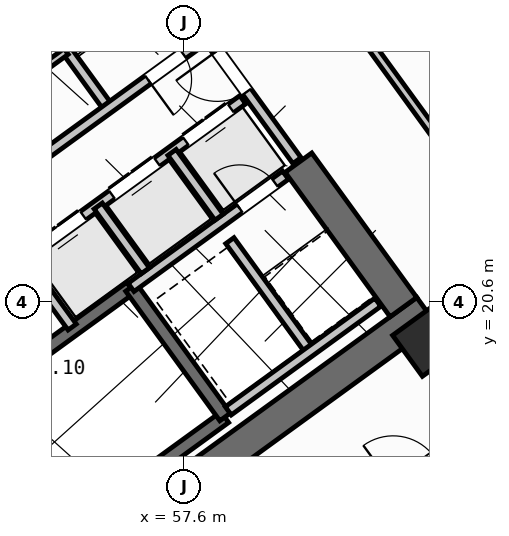
"""IFC4 building model, lengths in metres.
Left out: names, types, materials, properties, quantities, classifications, styles, units other than length and angle.
Written with IfcOpenShell. Run it as: python <this file> out.ifc"""

import sys

from ifc_helpers import new_model, si_unit, direction, frame, frame_2d, origin, origin_2d, place, context, subcontext, project, spatial, rectangle, hollow_rectangle, extrude, source, transform, mapped, element, fill, save


model = new_model("IFC4")
c1 = context("Model", 3, precision=1e-05, world=origin(), true_north=direction((0.0, 1.0)))
c2 = subcontext(c1, "Body", "Model", "MODEL_VIEW")
j1 = project(units=[si_unit("LENGTHUNIT", "METRE"), si_unit("PLANEANGLEUNIT", "RADIAN")], contexts=[c1])
p1 = place(None, origin())
s1 = spatial("IfcSite", under=j1, at=p1, CompositionType="ELEMENT")
p2 = place(p1, origin())
s2 = spatial("IfcBuilding", under=s1, at=p2, CompositionType="ELEMENT")
p3 = place(p2, frame((0.0, 0.0, 42.0)))
s3 = spatial("IfcBuildingStorey", under=s2, at=p3, CompositionType="ELEMENT", Elevation=42.0)
p4 = place(p3, frame((52.318, 13.11, 0.0), z_axis=(0.0, 0.0, 1.0), x_axis=(0.809019445368, 0.587781878776, 0.0)))
e1 = element("IfcWall", 1, at=p4, inside=s3, PredefinedType="SHEAR", context=c2, shape_type="SweptSolid", body=[
    extrude(rectangle(XDim=12.44, YDim=0.65, at=frame_2d((6.22, 0.0))), origin(), (0.0, 0.0, 1.0), 3.35),
])
p5 = place(p3, frame((61.929, 20.494, 0.0), z_axis=(0.0, 0.0, 1.0), x_axis=(-0.58782982593, 0.808984607855, 0.0)))
e2 = element("IfcWall", 2, at=p5, inside=s3, PredefinedType="SHEAR", context=c2, shape_type="SweptSolid", body=[
    extrude(rectangle(XDim=3.525, YDim=0.65, at=frame_2d((1.762, 0.0))), origin(), (0.0, 0.0, 1.0), 3.35),
])
m1 = source(origin(), c2, "Body", "SweptSolid", [
    extrude(hollow_rectangle(XDim=1.0, YDim=1.0, WallThickness=0.04, at=origin_2d()), origin(), (0.0, 0.0, 1.0), 3.6),
])
p6 = place(p3, frame((62.414, 19.827, 0.0), z_axis=(0.0, 0.0, 1.0), x_axis=(0.809016994375, 0.587785252292, 0.0)))
e3 = element("IfcColumn", 3, at=p6, inside=s3, PredefinedType="COLUMN", context=c2, shape_type="MappedRepresentation", body=[
    mapped(m1, transform((0.0, 0.0, 0.0), scale=1.0)),
])
p7 = place(p3, frame((43.938, 25.192, 0.0), z_axis=(0.0, 0.0, 1.0), x_axis=(0.809016324578, 0.587786174187, 0.0)))
e4 = element("IfcWall", 4, at=p7, inside=s3, PredefinedType="STANDARD", context=c2, shape_type="SweptSolid", body=[
    extrude(rectangle(XDim=17.587, YDim=0.32, at=frame_2d((8.794, 0.0))), origin(), (0.0, 0.0, 1.0), 3.35),
])
p8 = place(p7, frame((14.914, 0.0, 0.0)))
e5 = element("IfcOpeningElement", 5, at=p8, cuts=e4, PredefinedType="OPENING", context=c2, shape_type="SweptSolid", body=[
    extrude(rectangle(XDim=1.05, YDim=2.15, at=frame_2d((0.525, 1.075))), frame((0.0, 0.17, 0.0), z_axis=(0.0, -1.0, 0.0), x_axis=(1.0, 0.0, 0.0)), (0.0, 0.0, 1.0), 0.34),
])
p9 = place(p7, frame((2.169, 0.0, 0.8)))
e6 = element("IfcOpeningElement", 6, at=p9, cuts=e4, PredefinedType="OPENING", context=c2, shape_type="SweptSolid", body=[
    extrude(rectangle(XDim=2.1, YDim=1.55, at=frame_2d((1.05, 0.775))), frame((0.0, 0.17, 0.0), z_axis=(0.0, -1.0, 0.0), x_axis=(1.0, 0.0, 0.0)), (0.0, 0.0, 1.0), 0.34),
])
p10 = place(p7, frame((7.319, 0.0, 0.8)))
e7 = element("IfcOpeningElement", 7, at=p10, cuts=e4, PredefinedType="OPENING", context=c2, shape_type="SweptSolid", body=[
    extrude(rectangle(XDim=2.1, YDim=1.55, at=frame_2d((1.05, 0.775))), frame((0.0, 0.17, 0.0), z_axis=(0.0, -1.0, 0.0), x_axis=(1.0, 0.0, 0.0)), (0.0, 0.0, 1.0), 0.34),
])
p11 = place(p3, frame((58.455, 35.484, 0.0), z_axis=(0.0, 0.0, 1.0), x_axis=(0.587783625747, -0.809018176127, 0.0)))
e8 = element("IfcWall", 8, at=p11, inside=s3, PredefinedType="STANDARD", context=c2, shape_type="SweptSolid", body=[
    extrude(rectangle(XDim=21.587, YDim=0.32, at=frame_2d((10.794, 0.0))), origin(), (0.0, 0.0, 1.0), 2.725),
])
p12 = place(p11, frame((1.529, 0.0, 0.85)))
e9 = element("IfcOpeningElement", 9, at=p12, cuts=e8, PredefinedType="OPENING", context=c2, shape_type="SweptSolid", body=[
    extrude(rectangle(XDim=1.8, YDim=1.5, at=frame_2d((0.9, 0.75))), frame((0.0, 0.17, 0.0), z_axis=(0.0, -1.0, 0.0), x_axis=(1.0, 0.0, 0.0)), (0.0, 0.0, 1.0), 0.34),
])
p13 = place(p11, frame((10.444, 0.0, 0.85)))
e10 = element("IfcOpeningElement", 10, at=p13, cuts=e8, PredefinedType="OPENING", context=c2, shape_type="SweptSolid", body=[
    extrude(rectangle(XDim=1.8, YDim=1.5, at=frame_2d((0.9, 0.75))), frame((0.0, 0.17, 0.0), z_axis=(0.0, -1.0, 0.0), x_axis=(1.0, 0.0, 0.0)), (0.0, 0.0, 1.0), 0.34),
])
p14 = place(p11, frame((17.595, 0.0, 0.85)))
e11 = element("IfcOpeningElement", 11, at=p14, cuts=e8, PredefinedType="OPENING", context=c2, shape_type="SweptSolid", body=[
    extrude(rectangle(XDim=1.5, YDim=1.5, at=frame_2d((0.75, 0.75))), frame((0.0, 0.17, 0.0), z_axis=(0.0, -1.0, 0.0), x_axis=(1.0, 0.0, 0.0)), (0.0, 0.0, 1.0), 0.34),
])
p15 = place(p3, frame((71.098, 17.731, 0.0), z_axis=(0.0, 0.0, 1.0), x_axis=(-0.809021120468, -0.587779573171, 0.0)))
e12 = element("IfcWall", 12, at=p15, inside=s3, PredefinedType="STANDARD", context=c2, shape_type="SweptSolid", body=[
    extrude(rectangle(XDim=17.588, YDim=0.32, at=frame_2d((8.794, 0.0))), origin(), (0.0, 0.0, 1.0), 3.35),
])
p16 = place(p15, frame((1.624, 0.0, 0.0)))
e13 = element("IfcOpeningElement", 13, at=p16, cuts=e12, PredefinedType="OPENING", context=c2, shape_type="SweptSolid", body=[
    extrude(rectangle(XDim=1.05, YDim=2.15, at=frame_2d((0.525, 1.075))), frame((0.0, 0.17, 0.0), z_axis=(0.0, -1.0, 0.0), x_axis=(1.0, 0.0, 0.0)), (0.0, 0.0, 1.0), 0.34),
])
p17 = place(p15, frame((4.104, 0.0, 1.0)))
e14 = element("IfcOpeningElement", 14, at=p17, cuts=e12, PredefinedType="OPENING", context=c2, shape_type="SweptSolid", body=[
    extrude(rectangle(XDim=0.9, YDim=1.25, at=frame_2d((0.45, 0.625))), frame((0.0, 0.17, 0.0), z_axis=(0.0, -1.0, 0.0), x_axis=(1.0, 0.0, 0.0)), (0.0, 0.0, 1.0), 0.34),
])
p18 = place(p15, frame((7.879, 0.0, 0.85)))
e15 = element("IfcOpeningElement", 15, at=p18, cuts=e12, PredefinedType="OPENING", context=c2, shape_type="SweptSolid", body=[
    extrude(rectangle(XDim=1.8, YDim=1.5, at=frame_2d((0.9, 0.75))), frame((0.0, 0.17, 0.0), z_axis=(0.0, -1.0, 0.0), x_axis=(1.0, 0.0, 0.0)), (0.0, 0.0, 1.0), 0.34),
])
p19 = place(p15, frame((13.529, 0.0, 0.85)))
e16 = element("IfcOpeningElement", 16, at=p19, cuts=e12, PredefinedType="OPENING", context=c2, shape_type="SweptSolid", body=[
    extrude(rectangle(XDim=1.5, YDim=1.5, at=frame_2d((0.75, 0.75))), frame((0.0, 0.17, 0.0), z_axis=(0.0, -1.0, 0.0), x_axis=(1.0, 0.0, 0.0)), (0.0, 0.0, 1.0), 0.34),
])
p20 = place(p3, frame((49.863, 23.44, 0.0), z_axis=(0.0, 0.0, 1.0), x_axis=(0.809003474932, 0.587803859759, 0.0)))
e17 = element("IfcWall", 17, at=p20, inside=s3, PredefinedType="SHEAR", context=c2, shape_type="SweptSolid", body=[
    extrude(rectangle(XDim=7.46, YDim=0.26, at=frame_2d((3.73, 0.0))), origin(), (0.0, 0.0, 1.0), 3.35),
])
p21 = place(p20, frame((0.36, 0.0, 0.0)))
e18 = element("IfcOpeningElement", 18, at=p21, cuts=e17, PredefinedType="OPENING", context=c2, shape_type="SweptSolid", body=[
    extrude(rectangle(XDim=0.86, YDim=2.05, at=frame_2d((0.43, 1.025))), frame((0.0, 0.14, 0.0), z_axis=(0.0, -1.0, 0.0), x_axis=(1.0, 0.0, 0.0)), (0.0, 0.0, 1.0), 0.28),
])
p22 = place(p3, frame((52.472, 14.013, 0.0), z_axis=(0.0, 0.0, 1.0), x_axis=(0.809028366311, 0.587769599847, 0.0)))
e19 = element("IfcWall", 19, at=p22, inside=s3, PredefinedType="SHEAR", context=c2, shape_type="SweptSolid", body=[
    extrude(rectangle(XDim=7.33, YDim=0.26, at=frame_2d((3.665, 0.0))), origin(), (0.0, 0.0, 1.0), 3.35),
])
p23 = place(p3, frame((50.615, 16.57, 0.0), z_axis=(0.0, 0.0, 1.0), x_axis=(0.809028366311, 0.587769599847, 0.0)))
e20 = element("IfcWall", 20, at=p23, inside=s3, PredefinedType="SHEAR", context=c2, shape_type="SweptSolid", body=[
    extrude(rectangle(XDim=7.33, YDim=0.26, at=frame_2d((3.665, 0.0))), origin(), (0.0, 0.0, 1.0), 3.35),
])
p24 = place(p23, frame((0.22, 0.0, 0.0)))
e21 = element("IfcOpeningElement", 21, at=p24, cuts=e20, PredefinedType="OPENING", context=c2, shape_type="SweptSolid", body=[
    extrude(rectangle(XDim=1.1, YDim=2.1, at=frame_2d((0.55, 1.05))), frame((0.0, 0.14, 0.0), z_axis=(0.0, -1.0, 0.0), x_axis=(1.0, 0.0, 0.0)), (0.0, 0.0, 1.0), 0.28),
])
p25 = place(p3, frame((58.41, 18.327, 0.0), z_axis=(0.0, 0.0, 1.0), x_axis=(-0.58776738483, 0.809029975545, 0.0)))
e22 = element("IfcWall", 22, at=p25, inside=s3, PredefinedType="SHEAR", context=c2, shape_type="SweptSolid", body=[
    extrude(rectangle(XDim=3.16, YDim=0.26, at=frame_2d((1.58, 0.0))), origin(), (0.0, 0.0, 1.0), 3.35),
])
p26 = place(p3, frame((56.553, 20.884, 0.0), z_axis=(0.0, 0.0, 1.0), x_axis=(0.809035789462, 0.587759382205, 0.0)))
e23 = element("IfcWall", 23, at=p26, inside=s3, PredefinedType="STANDARD", context=c2, shape_type="SweptSolid", body=[
    extrude(rectangle(XDim=3.768, YDim=0.2, at=frame_2d((1.884, 0.0))), origin(), (0.0, 0.0, 1.0), 3.34),
])
p27 = place(p26, frame((2.65, 0.0, 0.0)))
e24 = element("IfcOpeningElement", 24, at=p27, cuts=e23, PredefinedType="OPENING", context=c2, shape_type="SweptSolid", body=[
    extrude(rectangle(XDim=0.86, YDim=2.05, at=frame_2d((0.43, 1.025))), frame((0.0, 0.11, 0.0), z_axis=(0.0, -1.0, 0.0), x_axis=(1.0, 0.0, 0.0)), (0.0, 0.0, 1.0), 0.22),
])
p28 = place(p3, frame((54.421, 21.436, 0.0), z_axis=(0.0, 0.0, 1.0), x_axis=(0.809013710463, 0.587789772183, 0.0)))
e25 = element("IfcWall", 25, at=p28, inside=s3, PredefinedType="STANDARD", context=c2, shape_type="SweptSolid", body=[
    extrude(rectangle(XDim=5.36, YDim=0.2, at=frame_2d((2.68, 0.0))), origin(), (0.0, 0.0, 1.0), 3.34),
])
p29 = place(p28, frame((0.37, 0.0, 0.0)))
e26 = element("IfcOpeningElement", 26, at=p29, cuts=e25, PredefinedType="OPENING", context=c2, shape_type="SweptSolid", body=[
    extrude(rectangle(XDim=1.1, YDim=2.15, at=frame_2d((0.55, 1.075))), frame((0.0, 0.11, 0.0), z_axis=(0.0, -1.0, 0.0), x_axis=(1.0, 0.0, 0.0)), (0.0, 0.0, 1.0), 0.22),
])
p30 = place(p28, frame((2.17, 0.0, 0.0)))
e27 = element("IfcOpeningElement", 27, at=p30, cuts=e25, PredefinedType="OPENING", context=c2, shape_type="SweptSolid", body=[
    extrude(rectangle(XDim=1.1, YDim=2.15, at=frame_2d((0.55, 1.075))), frame((0.0, 0.11, 0.0), z_axis=(0.0, -1.0, 0.0), x_axis=(1.0, 0.0, 0.0)), (0.0, 0.0, 1.0), 0.22),
])
p31 = place(p28, frame((3.97, 0.0, 0.0)))
e28 = element("IfcOpeningElement", 28, at=p31, cuts=e25, PredefinedType="OPENING", context=c2, shape_type="SweptSolid", body=[
    extrude(rectangle(XDim=1.1, YDim=2.15, at=frame_2d((0.55, 1.075))), frame((0.0, 0.11, 0.0), z_axis=(0.0, -1.0, 0.0), x_axis=(1.0, 0.0, 0.0)), (0.0, 0.0, 1.0), 0.22),
])
p32 = place(p3, frame((55.391, 20.102, 0.0), z_axis=(0.0, 0.0, 1.0), x_axis=(-0.58778447739, 0.809017557374, 0.0)))
e29 = element("IfcWall", 29, at=p32, inside=s3, PredefinedType="STANDARD", context=c2, shape_type="SweptSolid", body=[
    extrude(rectangle(XDim=1.65, YDim=0.2, at=frame_2d((0.825, 0.0))), origin(), (0.0, 0.0, 1.0), 3.34),
])
p33 = place(p3, frame((56.834, 21.212, 0.0), z_axis=(0.0, 0.0, 1.0), x_axis=(-0.58776738483, 0.809029975545, 0.0)))
e30 = element("IfcWall", 30, at=p33, inside=s3, PredefinedType="STANDARD", context=c2, shape_type="SweptSolid", body=[
    extrude(rectangle(XDim=1.58, YDim=0.2, at=frame_2d((0.79, 0.0))), origin(), (0.0, 0.0, 1.0), 3.34),
])
p34 = place(p3, frame((58.29, 22.27, 0.0), z_axis=(0.0, 0.0, 1.0), x_axis=(-0.587840865826, 0.808976585857, 0.0)))
e31 = element("IfcWall", 31, at=p34, inside=s3, PredefinedType="STANDARD", context=c2, shape_type="SweptSolid", body=[
    extrude(rectangle(XDim=1.58, YDim=0.2, at=frame_2d((0.79, 0.0))), origin(), (0.0, 0.0, 1.0), 3.34),
])
p35 = place(p3, frame((60.067, 19.655, 0.0), z_axis=(0.0, 0.0, 1.0), x_axis=(-0.587800520745, 0.809005900975, 0.0)))
e32 = element("IfcWall", 32, at=p35, inside=s3, PredefinedType="STANDARD", context=c2, shape_type="SweptSolid", body=[
    extrude(rectangle(XDim=2.66, YDim=0.2, at=frame_2d((1.33, 0.0))), origin(), (0.0, 0.0, 1.0), 3.34),
])
p36 = place(p3, frame((58.472, 18.447, 0.0), z_axis=(0.0, 0.0, 1.0), x_axis=(0.809022487728, 0.587777691266, 0.0)))
e33 = element("IfcWall", 33, at=p36, inside=s3, PredefinedType="STANDARD", context=c2, shape_type="SweptSolid", body=[
    extrude(rectangle(XDim=3.648, YDim=0.2, at=frame_2d((1.824, 0.0))), origin(), (0.0, 0.0, 1.0), 3.34),
])
p37 = place(p3, frame((56.111, 24.419, 0.0), z_axis=(0.0, 0.0, 1.0), x_axis=(-0.58777848983, 0.809021907548, 0.0)))
e34 = element("IfcWall", 34, at=p37, inside=s3, PredefinedType="STANDARD", context=c2, shape_type="SweptSolid", body=[
    extrude(rectangle(XDim=2.88, YDim=0.2, at=frame_2d((1.44, 0.0))), origin(), (0.0, 0.0, 1.0), 3.34),
])
p38 = place(p3, frame((53.425, 22.468, 0.0), z_axis=(0.0, 0.0, 1.0), x_axis=(0.80902705128, 0.587771409902, 0.0)))
e35 = element("IfcWall", 35, at=p38, inside=s3, PredefinedType="STANDARD", context=c2, shape_type="SweptSolid", body=[
    extrude(rectangle(XDim=5.368, YDim=0.2, at=frame_2d((2.684, 0.0))), origin(), (0.0, 0.0, 1.0), 3.34),
])
p39 = place(p38, frame((4.28, 0.0, 0.0)))
e36 = element("IfcOpeningElement", 36, at=p39, cuts=e35, PredefinedType="OPENING", context=c2, shape_type="SweptSolid", body=[
    extrude(rectangle(XDim=0.86, YDim=2.05, at=frame_2d((0.43, 1.025))), frame((0.0, 0.11, 0.0), z_axis=(0.0, -1.0, 0.0), x_axis=(1.0, 0.0, 0.0)), (0.0, 0.0, 1.0), 0.22),
])
p40 = place(p38, frame((0.35, 0.0, 0.0)))
e37 = element("IfcOpeningElement", 37, at=p40, cuts=e35, PredefinedType="OPENING", context=c2, shape_type="SweptSolid", body=[
    extrude(rectangle(XDim=0.86, YDim=2.05, at=frame_2d((0.43, 1.025))), frame((0.0, 0.11, 0.0), z_axis=(0.0, -1.0, 0.0), x_axis=(1.0, 0.0, 0.0)), (0.0, 0.0, 1.0), 0.22),
])
p41 = place(p3, frame((52.618, 23.612, 0.0), z_axis=(0.0, 0.0, 1.0), x_axis=(0.809009587469, 0.587795446889, 0.0)))
e38 = element("IfcWall", 38, at=p41, inside=s3, PredefinedType="PLUMBINGWALL", context=c2, shape_type="SweptSolid", body=[
    extrude(rectangle(XDim=3.28, YDim=0.14, at=frame_2d((1.64, 0.0))), origin(), (0.0, 0.0, 1.0), 3.34),
])
p42 = place(p41, frame((0.25, 0.0, 0.0)))
e39 = element("IfcOpeningElement", 39, at=p42, cuts=e38, PredefinedType="OPENING", context=c2, shape_type="SweptSolid", body=[
    extrude(rectangle(XDim=0.78, YDim=2.05, at=frame_2d((0.39, 1.025))), frame((0.0, 0.08, 0.0), z_axis=(0.0, -1.0, 0.0), x_axis=(1.0, 0.0, 0.0)), (0.0, 0.0, 1.0), 0.16),
])
p43 = place(p41, frame((1.92, 0.0, 0.0)))
e40 = element("IfcOpeningElement", 40, at=p43, cuts=e38, PredefinedType="OPENING", context=c2, shape_type="SweptSolid", body=[
    extrude(rectangle(XDim=0.78, YDim=2.05, at=frame_2d((0.39, 1.025))), frame((0.0, 0.08, 0.0), z_axis=(0.0, -1.0, 0.0), x_axis=(1.0, 0.0, 0.0)), (0.0, 0.0, 1.0), 0.16),
])
p44 = place(p3, frame((59.827, 23.386, 0.0), z_axis=(0.0, 0.0, 1.0), x_axis=(-0.587803840107, 0.809003489211, 0.0)))
e41 = element("IfcWall", 41, at=p44, inside=s3, PredefinedType="STANDARD", context=c2, shape_type="SweptSolid", body=[
    extrude(rectangle(XDim=2.96, YDim=0.2, at=frame_2d((1.48, 0.0))), origin(), (0.0, 0.0, 1.0), 3.34),
])
p45 = place(p44, frame((1.68, 0.0, 0.0)))
e42 = element("IfcOpeningElement", 42, at=p45, cuts=e41, PredefinedType="OPENING", context=c2, shape_type="SweptSolid", body=[
    extrude(rectangle(XDim=1.0, YDim=2.1, at=frame_2d((0.5, 1.05))), frame((0.0, 0.11, 0.0), z_axis=(0.0, -1.0, 0.0), x_axis=(1.0, 0.0, 0.0)), (0.0, 0.0, 1.0), 0.22),
])
p46 = place(p3, frame((68.353, 15.922, 0.0), z_axis=(0.0, 0.0, 1.0), x_axis=(-0.587782002009, 0.809019355834, 0.0)))
e43 = element("IfcWall", 43, at=p46, inside=s3, PredefinedType="PARTITIONING", context=c2, shape_type="SweptSolid", body=[
    extrude(rectangle(XDim=15.35, YDim=0.16, at=frame_2d((7.675, 0.0))), origin(), (0.0, 0.0, 1.0), 3.34),
])
p47 = place(p3, frame((53.705, 11.126, 0.0), z_axis=(0.0, 0.0, 1.0), x_axis=(0.809014504436, 0.587788679384, 0.0)))
e44 = element("IfcWall", 44, at=p47, inside=s3, PredefinedType="PARTITIONING", context=c2, shape_type="SweptSolid", body=[
    extrude(rectangle(XDim=14.67, YDim=0.16, at=frame_2d((7.335, 0.0))), origin(), (0.0, 0.0, 1.0), 3.34),
])
p48 = place(p47, frame((3.215, 0.0, 0.0)))
e45 = element("IfcOpeningElement", 45, at=p48, cuts=e44, PredefinedType="OPENING", context=c2, shape_type="SweptSolid", body=[
    extrude(rectangle(XDim=1.0, YDim=2.1, at=frame_2d((0.5, 1.05))), frame((0.0, 0.09, 0.0), z_axis=(0.0, -1.0, 0.0), x_axis=(1.0, 0.0, 0.0)), (0.0, 0.0, 1.0), 0.18),
])
p49 = place(p47, frame((9.915, 0.0, 0.0)))
e46 = element("IfcOpeningElement", 46, at=p49, cuts=e44, PredefinedType="OPENING", context=c2, shape_type="SweptSolid", body=[
    extrude(rectangle(XDim=1.0, YDim=2.1, at=frame_2d((0.5, 1.05))), frame((0.0, 0.09, 0.0), z_axis=(0.0, -1.0, 0.0), x_axis=(1.0, 0.0, 0.0)), (0.0, 0.0, 1.0), 0.18),
])
m2 = source(origin(), c2, "Body", "SweptSolid", [
    extrude(rectangle(XDim=1.1, YDim=2.15, at=frame_2d((0.55, 1.075))), frame((0.0, 0.025, 0.0), z_axis=(0.0, -1.0, 0.0), x_axis=(1.0, 0.0, 0.0)), (0.0, 0.0, 1.0), 0.05),
])
p50 = place(p29, origin())
e47 = element("IfcDoor", 47, at=p50, inside=s3, OperationType="DOUBLE_DOOR_SLIDING", PredefinedType="DOOR", context=c2, shape_type="MappedRepresentation", body=[
    mapped(m2, transform((0.0, 0.0, 0.0), scale=1.0)),
])
fill(e26, e47)
p51 = place(p30, origin())
e48 = element("IfcDoor", 48, at=p51, inside=s3, OperationType="DOUBLE_DOOR_SLIDING", PredefinedType="DOOR", context=c2, shape_type="MappedRepresentation", body=[
    mapped(m2, transform((0.0, 0.0, 0.0), scale=1.0)),
])
fill(e27, e48)
p52 = place(p31, origin())
e49 = element("IfcDoor", 49, at=p52, inside=s3, OperationType="DOUBLE_DOOR_SLIDING", PredefinedType="DOOR", context=c2, shape_type="MappedRepresentation", body=[
    mapped(m2, transform((0.0, 0.0, 0.0), scale=1.0)),
])
fill(e28, e49)
m3 = source(origin(), c2, "Body", "SweptSolid", [
    extrude(rectangle(XDim=0.86, YDim=2.05, at=frame_2d((0.43, 1.025))), frame((0.0, 0.025, 0.0), z_axis=(0.0, -1.0, 0.0), x_axis=(1.0, 0.0, 0.0)), (0.0, 0.0, 1.0), 0.05),
])
p53 = place(p27, origin())
e50 = element("IfcDoor", 50, at=p53, inside=s3, OperationType="SINGLE_SWING_LEFT", PredefinedType="DOOR", context=c2, shape_type="MappedRepresentation", body=[
    mapped(m3, transform((0.0, 0.0, 0.0), scale=1.0)),
])
fill(e24, e50)
p54 = place(p39, frame((0.86, 0.0, 0.0), z_axis=(0.0, 0.0, 1.0), x_axis=(-1.0, 0.0, 0.0)))
e51 = element("IfcDoor", 51, at=p54, inside=s3, OperationType="SINGLE_SWING_RIGHT", PredefinedType="DOOR", context=c2, shape_type="MappedRepresentation", body=[
    mapped(m3, transform((0.0, 0.0, 0.0), scale=1.0)),
])
fill(e36, e51)
m4 = source(origin(), c2, "Body", "SweptSolid", [
    extrude(rectangle(XDim=1.0, YDim=2.1, at=frame_2d((0.5, 1.05))), frame((0.0, 0.025, 0.0), z_axis=(0.0, -1.0, 0.0), x_axis=(1.0, 0.0, 0.0)), (0.0, 0.0, 1.0), 0.05),
])
p55 = place(p45, origin())
e52 = element("IfcDoor", 52, at=p55, inside=s3, OperationType="SINGLE_SWING_RIGHT", PredefinedType="DOOR", context=c2, shape_type="MappedRepresentation", body=[
    mapped(m4, transform((0.0, 0.0, 0.0), scale=1.0)),
])
fill(e42, e52)
p56 = place(p49, origin())
e53 = element("IfcDoor", 53, at=p56, inside=s3, OperationType="SINGLE_SWING_LEFT", PredefinedType="DOOR", context=c2, shape_type="MappedRepresentation", body=[
    mapped(m4, transform((0.0, 0.0, 0.0), scale=1.0)),
])
fill(e46, e53)
save(model, sys.argv[1])
